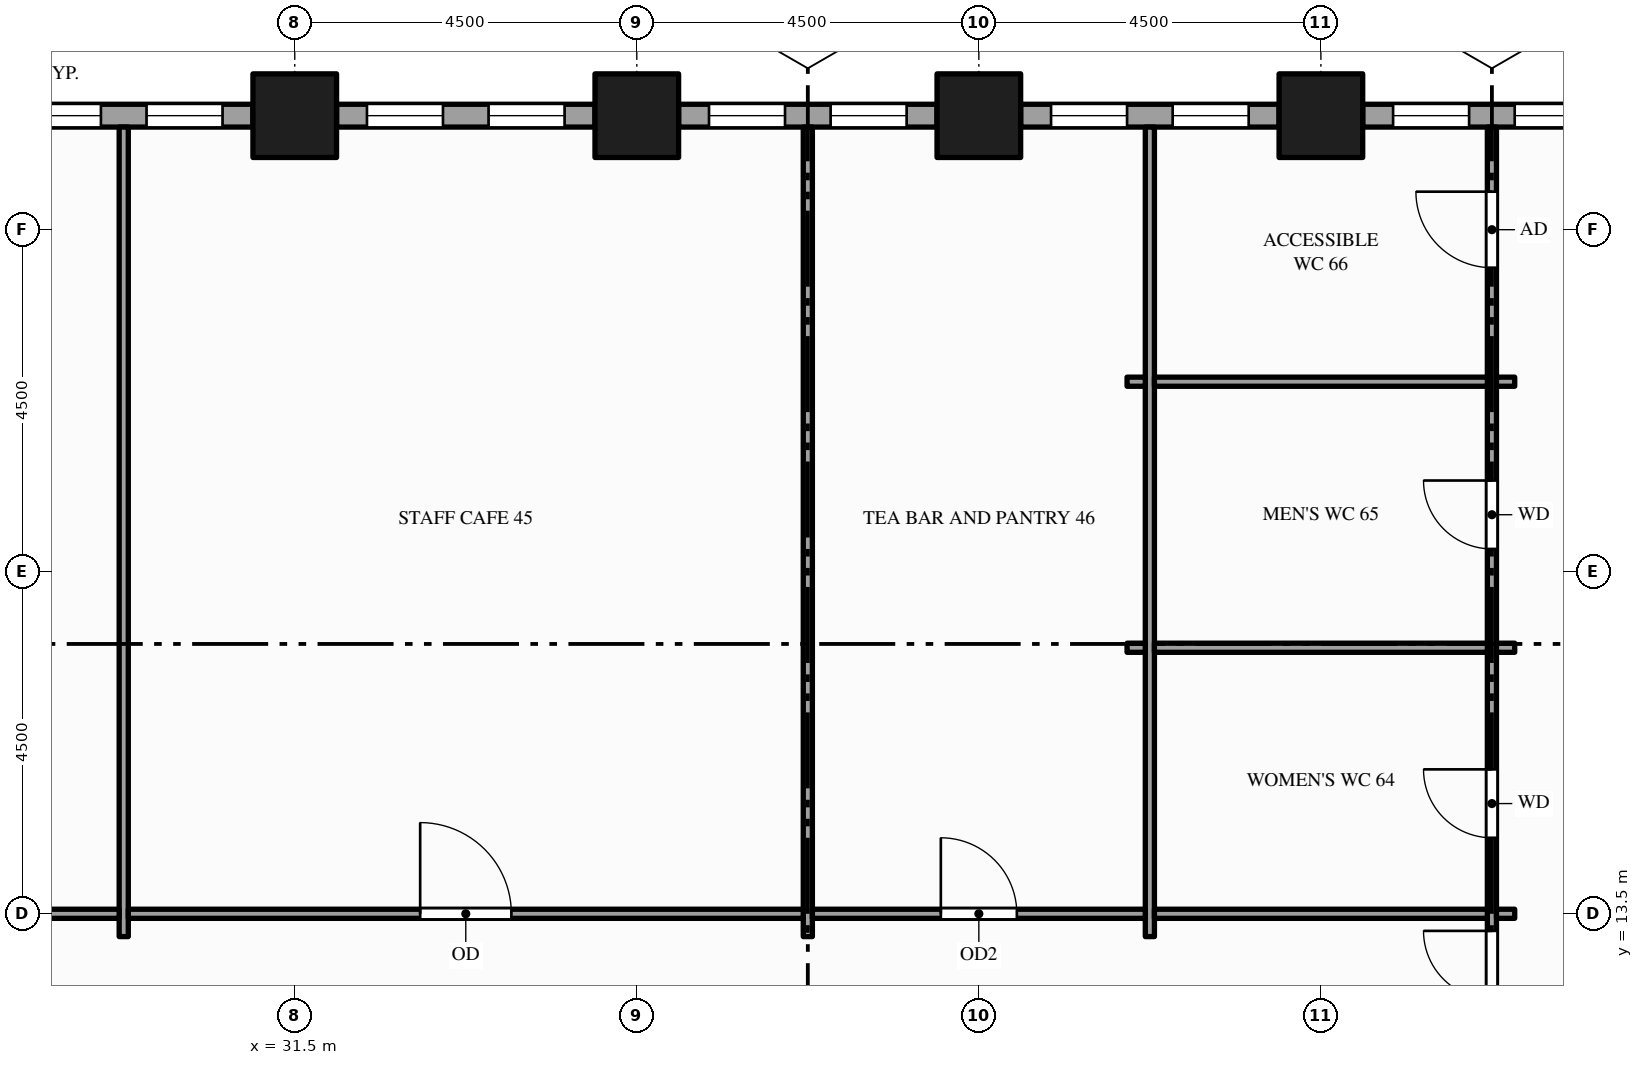
"""IFC4 building model, lengths in metres.
Left out: names, types, materials, properties, quantities, classifications, styles, units other than length and angle.
Written with IfcOpenShell. Run it as: python <this file> out.ifc"""

import sys

from ifc_helpers import new_model, si_unit, direction, frame, frame_2d, origin, origin_2d, place, context, subcontext, project, spatial, rectangle, hollow_rectangle, extrude, element, fill, save


model = new_model("IFC4")
c1 = context("Model", 3, precision=1e-05, world=origin(), true_north=direction((0.0, 1.0)))
c2 = subcontext(c1, "Body", "Model", "MODEL_VIEW")
j1 = project(units=[si_unit("LENGTHUNIT", "METRE"), si_unit("PLANEANGLEUNIT", "RADIAN")], contexts=[c1])
p1 = place(None, origin())
s1 = spatial("IfcSite", under=j1, at=p1, CompositionType="ELEMENT")
p2 = place(p1, origin())
s2 = spatial("IfcBuilding", under=s1, at=p2, CompositionType="ELEMENT")
p3 = place(p2, frame((0.0, 0.0, 45.0)))
s3 = spatial("IfcBuildingStorey", under=s2, at=p3, CompositionType="ELEMENT", Elevation=45.0)
for number, where, z_axis, x_axis in (
    (1, (31.5, 24.0, -0.15), (0.0, 0.0, 1.0), (1.0, 0.0, 0.0)),
    (2, (36.0, 24.0, -0.15), (0.0, 0.0, 1.0), (1.0, 0.0, 0.0)),
    (3, (40.5, 24.0, -0.15), (0.0, 0.0, 1.0), (1.0, 0.0, 0.0)),
    (4, (45.0, 24.0, -0.15), (0.0, 0.0, 1.0), (1.0, 0.0, 0.0)),
):
    element("IfcColumn", number, at=place(p3, frame(where, z_axis=z_axis, x_axis=x_axis)), inside=s3, PredefinedType="COLUMN", context=c2, shape_type="SweptSolid", body=[
        extrude(hollow_rectangle(XDim=1.1, YDim=1.1, WallThickness=0.06, at=origin_2d()), origin(), (0.0, 0.0, 1.0), 4.0),
    ])
p4 = place(p3, frame((48.95, 24.0, 0.0), z_axis=(0.0, 0.0, 1.0), x_axis=(-1.0, 0.0, 0.0)))
e5 = element("IfcWall", 5, at=p4, inside=s3, PredefinedType="STANDARD", context=c2, shape_type="SweptSolid", body=[
    extrude(rectangle(XDim=3.4, YDim=0.3, at=frame_2d((1.7, 0.0))), origin(), (0.0, 0.0, 1.0), 3.144),
])
p5 = place(p4, frame((0.4, 0.0, 0.9)))
e6 = element("IfcOpeningElement", 6, at=p5, cuts=e5, PredefinedType="OPENING", context=c2, shape_type="SweptSolid", body=[
    extrude(rectangle(XDim=1.0, YDim=2.0, at=frame_2d((0.5, 1.0))), frame((0.0, 0.16, 0.0), z_axis=(0.0, -1.0, 0.0), x_axis=(1.0, 0.0, 0.0)), (0.0, 0.0, 1.0), 0.32),
])
p6 = place(p4, frame((2.0, 0.0, 0.9)))
e7 = element("IfcOpeningElement", 7, at=p6, cuts=e5, PredefinedType="OPENING", context=c2, shape_type="SweptSolid", body=[
    extrude(rectangle(XDim=1.0, YDim=2.0, at=frame_2d((0.5, 1.0))), frame((0.0, 0.16, 0.0), z_axis=(0.0, -1.0, 0.0), x_axis=(1.0, 0.0, 0.0)), (0.0, 0.0, 1.0), 0.32),
])
p7 = place(p3, frame((44.45, 24.0, 0.0), z_axis=(0.0, 0.0, 1.0), x_axis=(-1.0, 0.0, 0.0)))
e8 = element("IfcWall", 8, at=p7, inside=s3, PredefinedType="STANDARD", context=c2, shape_type="SweptSolid", body=[
    extrude(rectangle(XDim=3.4, YDim=0.3, at=frame_2d((1.7, 0.0))), origin(), (0.0, 0.0, 1.0), 3.144),
])
p8 = place(p7, frame((0.4, 0.0, 0.9)))
e9 = element("IfcOpeningElement", 9, at=p8, cuts=e8, PredefinedType="OPENING", context=c2, shape_type="SweptSolid", body=[
    extrude(rectangle(XDim=1.0, YDim=2.0, at=frame_2d((0.5, 1.0))), frame((0.0, 0.16, 0.0), z_axis=(0.0, -1.0, 0.0), x_axis=(1.0, 0.0, 0.0)), (0.0, 0.0, 1.0), 0.32),
])
p9 = place(p7, frame((2.0, 0.0, 0.9)))
e10 = element("IfcOpeningElement", 10, at=p9, cuts=e8, PredefinedType="OPENING", context=c2, shape_type="SweptSolid", body=[
    extrude(rectangle(XDim=1.0, YDim=2.0, at=frame_2d((0.5, 1.0))), frame((0.0, 0.16, 0.0), z_axis=(0.0, -1.0, 0.0), x_axis=(1.0, 0.0, 0.0)), (0.0, 0.0, 1.0), 0.32),
])
p10 = place(p3, frame((39.95, 24.0, 0.0), z_axis=(0.0, 0.0, 1.0), x_axis=(-1.0, 0.0, 0.0)))
e11 = element("IfcWall", 11, at=p10, inside=s3, PredefinedType="STANDARD", context=c2, shape_type="SweptSolid", body=[
    extrude(rectangle(XDim=3.4, YDim=0.3, at=frame_2d((1.7, 0.0))), origin(), (0.0, 0.0, 1.0), 3.144),
])
p11 = place(p10, frame((0.4, 0.0, 0.9)))
e12 = element("IfcOpeningElement", 12, at=p11, cuts=e11, PredefinedType="OPENING", context=c2, shape_type="SweptSolid", body=[
    extrude(rectangle(XDim=1.0, YDim=2.0, at=frame_2d((0.5, 1.0))), frame((0.0, 0.16, 0.0), z_axis=(0.0, -1.0, 0.0), x_axis=(1.0, 0.0, 0.0)), (0.0, 0.0, 1.0), 0.32),
])
p12 = place(p10, frame((2.0, 0.0, 0.9)))
e13 = element("IfcOpeningElement", 13, at=p12, cuts=e11, PredefinedType="OPENING", context=c2, shape_type="SweptSolid", body=[
    extrude(rectangle(XDim=1.0, YDim=2.0, at=frame_2d((0.5, 1.0))), frame((0.0, 0.16, 0.0), z_axis=(0.0, -1.0, 0.0), x_axis=(1.0, 0.0, 0.0)), (0.0, 0.0, 1.0), 0.32),
])
p13 = place(p3, frame((35.45, 24.0, 0.0), z_axis=(0.0, 0.0, 1.0), x_axis=(-1.0, 0.0, 0.0)))
e14 = element("IfcWall", 14, at=p13, inside=s3, PredefinedType="STANDARD", context=c2, shape_type="SweptSolid", body=[
    extrude(rectangle(XDim=3.4, YDim=0.3, at=frame_2d((1.7, 0.0))), origin(), (0.0, 0.0, 1.0), 3.144),
])
p14 = place(p13, frame((0.4, 0.0, 0.9)))
e15 = element("IfcOpeningElement", 15, at=p14, cuts=e14, PredefinedType="OPENING", context=c2, shape_type="SweptSolid", body=[
    extrude(rectangle(XDim=1.0, YDim=2.0, at=frame_2d((0.5, 1.0))), frame((0.0, 0.16, 0.0), z_axis=(0.0, -1.0, 0.0), x_axis=(1.0, 0.0, 0.0)), (0.0, 0.0, 1.0), 0.32),
])
p15 = place(p13, frame((2.0, 0.0, 0.9)))
e16 = element("IfcOpeningElement", 16, at=p15, cuts=e14, PredefinedType="OPENING", context=c2, shape_type="SweptSolid", body=[
    extrude(rectangle(XDim=1.0, YDim=2.0, at=frame_2d((0.5, 1.0))), frame((0.0, 0.16, 0.0), z_axis=(0.0, -1.0, 0.0), x_axis=(1.0, 0.0, 0.0)), (0.0, 0.0, 1.0), 0.32),
])
p16 = place(p3, frame((30.95, 24.0, 0.0), z_axis=(0.0, 0.0, 1.0), x_axis=(-1.0, 0.0, 0.0)))
e17 = element("IfcWall", 17, at=p16, inside=s3, PredefinedType="STANDARD", context=c2, shape_type="SweptSolid", body=[
    extrude(rectangle(XDim=4.9, YDim=0.3, at=frame_2d((2.45, 0.0))), origin(), (0.0, 0.0, 1.0), 3.144),
])
p17 = place(p16, frame((0.4, 0.0, 0.9)))
e18 = element("IfcOpeningElement", 18, at=p17, cuts=e17, PredefinedType="OPENING", context=c2, shape_type="SweptSolid", body=[
    extrude(rectangle(XDim=1.0, YDim=2.0, at=frame_2d((0.5, 1.0))), frame((0.0, 0.16, 0.0), z_axis=(0.0, -1.0, 0.0), x_axis=(1.0, 0.0, 0.0)), (0.0, 0.0, 1.0), 0.32),
])
p18 = place(p16, frame((2.0, 0.0, 0.9)))
e19 = element("IfcOpeningElement", 19, at=p18, cuts=e17, PredefinedType="OPENING", context=c2, shape_type="SweptSolid", body=[
    extrude(rectangle(XDim=1.65, YDim=2.0, at=frame_2d((0.825, 1.0))), frame((0.0, 0.16, 0.0), z_axis=(0.0, -1.0, 0.0), x_axis=(1.0, 0.0, 0.0)), (0.0, 0.0, 1.0), 0.32),
])
for number, where, z_axis, x_axis in (
    (20, (29.25, 13.2, 0.0), (0.0, 0.0, 1.0), (0.0, 1.0, 0.0)),
    (21, (38.25, 13.2, 0.0), (0.0, 0.0, 1.0), (0.0, 1.0, 0.0)),
    (22, (42.75, 13.2, 0.0), (0.0, 0.0, 1.0), (0.0, 1.0, 0.0)),
):
    element("IfcWall", number, at=place(p3, frame(where, z_axis=z_axis, x_axis=x_axis)), inside=s3, PredefinedType="PARTITIONING", context=c2, shape_type="SweptSolid", body=[
        extrude(rectangle(XDim=10.65, YDim=0.12, at=frame_2d((5.325, 0.0))), origin(), (0.0, 0.0, 1.0), 2.938),
    ])
p19 = place(p3, frame((47.25, 1.65, 0.0), z_axis=(0.0, 0.0, 1.0), x_axis=(0.0, 1.0, 0.0)))
e23 = element("IfcWall", 23, at=p19, inside=s3, PredefinedType="PARTITIONING", context=c2, shape_type="SweptSolid", body=[
    extrude(rectangle(XDim=22.2, YDim=0.12, at=frame_2d((11.1, 0.0))), origin(), (0.0, 0.0, 1.0), 2.938),
])
p20 = place(p19, frame((9.825, 0.0, 0.0)))
e24 = element("IfcOpeningElement", 24, at=p20, cuts=e23, PredefinedType="OPENING", context=c2, shape_type="SweptSolid", body=[
    extrude(rectangle(XDim=1.8, YDim=2.1, at=frame_2d((0.9, 1.05))), frame((0.0, 0.07, 0.0), z_axis=(0.0, -1.0, 0.0), x_axis=(1.0, 0.0, 0.0)), (0.0, 0.0, 1.0), 0.14),
])
p21 = place(p19, frame((12.85, 0.0, 0.0)))
e25 = element("IfcOpeningElement", 25, at=p21, cuts=e23, PredefinedType="OPENING", context=c2, shape_type="SweptSolid", body=[
    extrude(rectangle(XDim=0.9, YDim=2.1, at=frame_2d((0.45, 1.05))), frame((0.0, 0.07, 0.0), z_axis=(0.0, -1.0, 0.0), x_axis=(1.0, 0.0, 0.0)), (0.0, 0.0, 1.0), 0.14),
])
p22 = place(p19, frame((16.65, 0.0, 0.0)))
e26 = element("IfcOpeningElement", 26, at=p22, cuts=e23, PredefinedType="OPENING", context=c2, shape_type="SweptSolid", body=[
    extrude(rectangle(XDim=0.9, YDim=2.1, at=frame_2d((0.45, 1.05))), frame((0.0, 0.07, 0.0), z_axis=(0.0, -1.0, 0.0), x_axis=(1.0, 0.0, 0.0)), (0.0, 0.0, 1.0), 0.14),
])
p23 = place(p19, frame((20.35, 0.0, 0.0)))
e27 = element("IfcOpeningElement", 27, at=p23, cuts=e23, PredefinedType="OPENING", context=c2, shape_type="SweptSolid", body=[
    extrude(rectangle(XDim=1.0, YDim=2.1, at=frame_2d((0.5, 1.05))), frame((0.0, 0.07, 0.0), z_axis=(0.0, -1.0, 0.0), x_axis=(1.0, 0.0, 0.0)), (0.0, 0.0, 1.0), 0.14),
])
p24 = place(p3, frame((9.06, 13.5, 0.0), z_axis=(0.0, 0.0, 1.0), x_axis=(1.0, 0.0, 0.0)))
e28 = element("IfcWall", 28, at=p24, inside=s3, PredefinedType="PARTITIONING", context=c2, shape_type="SweptSolid", body=[
    extrude(rectangle(XDim=20.13, YDim=0.12, at=frame_2d((10.065, 0.0))), origin(), (0.0, 0.0, 1.0), 2.938),
])
p25 = place(p24, frame((3.54, 0.0, 0.0)))
e29 = element("IfcOpeningElement", 29, at=p25, cuts=e28, PredefinedType="OPENING", context=c2, shape_type="SweptSolid", body=[
    extrude(rectangle(XDim=1.8, YDim=2.1, at=frame_2d((0.9, 1.05))), frame((0.0, 0.07, 0.0), z_axis=(0.0, -1.0, 0.0), x_axis=(1.0, 0.0, 0.0)), (0.0, 0.0, 1.0), 0.14),
])
p26 = place(p3, frame((29.31, 13.5, 0.0), z_axis=(0.0, 0.0, 1.0), x_axis=(1.0, 0.0, 0.0)))
e30 = element("IfcWall", 30, at=p26, inside=s3, PredefinedType="PARTITIONING", context=c2, shape_type="SweptSolid", body=[
    extrude(rectangle(XDim=8.88, YDim=0.12, at=frame_2d((4.44, 0.0))), origin(), (0.0, 0.0, 1.0), 2.938),
])
p27 = place(p26, frame((3.84, 0.0, 0.0)))
e31 = element("IfcOpeningElement", 31, at=p27, cuts=e30, PredefinedType="OPENING", context=c2, shape_type="SweptSolid", body=[
    extrude(rectangle(XDim=1.2, YDim=2.1, at=frame_2d((0.6, 1.05))), frame((0.0, 0.07, 0.0), z_axis=(0.0, -1.0, 0.0), x_axis=(1.0, 0.0, 0.0)), (0.0, 0.0, 1.0), 0.14),
])
p28 = place(p3, frame((38.31, 13.5, 0.0), z_axis=(0.0, 0.0, 1.0), x_axis=(1.0, 0.0, 0.0)))
e32 = element("IfcWall", 32, at=p28, inside=s3, PredefinedType="PARTITIONING", context=c2, shape_type="SweptSolid", body=[
    extrude(rectangle(XDim=4.38, YDim=0.12, at=frame_2d((2.19, 0.0))), origin(), (0.0, 0.0, 1.0), 2.938),
])
p29 = place(p28, frame((1.69, 0.0, 0.0)))
e33 = element("IfcOpeningElement", 33, at=p29, cuts=e32, PredefinedType="OPENING", context=c2, shape_type="SweptSolid", body=[
    extrude(rectangle(XDim=1.0, YDim=2.1, at=frame_2d((0.5, 1.05))), frame((0.0, 0.07, 0.0), z_axis=(0.0, -1.0, 0.0), x_axis=(1.0, 0.0, 0.0)), (0.0, 0.0, 1.0), 0.14),
])
p30 = place(p3, frame((42.81, 13.5, 0.0), z_axis=(0.0, 0.0, 1.0), x_axis=(1.0, 0.0, 0.0)))
e34 = element("IfcWall", 34, at=p30, inside=s3, PredefinedType="PARTITIONING", context=c2, shape_type="SweptSolid", body=[
    extrude(rectangle(XDim=4.38, YDim=0.12, at=frame_2d((2.19, 0.0))), origin(), (0.0, 0.0, 1.0), 2.938),
])
for number, where, z_axis, x_axis in (
    (35, (47.31, 13.5, 0.0), (0.0, 0.0, 1.0), (1.0, 0.0, 0.0)),
    (36, (42.45, 17.0, 0.0), (0.0, 0.0, 1.0), (1.0, 0.0, 0.0)),
):
    element("IfcWall", number, at=place(p3, frame(where, z_axis=z_axis, x_axis=x_axis)), inside=s3, PredefinedType="PARTITIONING", context=c2, shape_type="SweptSolid", body=[
        extrude(rectangle(XDim=0.24, YDim=0.12, at=frame_2d((0.12, 0.0))), origin(), (0.0, 0.0, 1.0), 2.938),
    ])
p31 = place(p3, frame((42.81, 17.0, 0.0), z_axis=(0.0, 0.0, 1.0), x_axis=(1.0, 0.0, 0.0)))
e37 = element("IfcWall", 37, at=p31, inside=s3, PredefinedType="PARTITIONING", context=c2, shape_type="SweptSolid", body=[
    extrude(rectangle(XDim=4.38, YDim=0.12, at=frame_2d((2.19, 0.0))), origin(), (0.0, 0.0, 1.0), 2.938),
])
for number, where, z_axis, x_axis in (
    (38, (47.31, 17.0, 0.0), (0.0, 0.0, 1.0), (1.0, 0.0, 0.0)),
    (39, (42.45, 20.5, 0.0), (0.0, 0.0, 1.0), (1.0, 0.0, 0.0)),
):
    element("IfcWall", number, at=place(p3, frame(where, z_axis=z_axis, x_axis=x_axis)), inside=s3, PredefinedType="PARTITIONING", context=c2, shape_type="SweptSolid", body=[
        extrude(rectangle(XDim=0.24, YDim=0.12, at=frame_2d((0.12, 0.0))), origin(), (0.0, 0.0, 1.0), 2.938),
    ])
p32 = place(p3, frame((42.81, 20.5, 0.0), z_axis=(0.0, 0.0, 1.0), x_axis=(1.0, 0.0, 0.0)))
e40 = element("IfcWall", 40, at=p32, inside=s3, PredefinedType="PARTITIONING", context=c2, shape_type="SweptSolid", body=[
    extrude(rectangle(XDim=4.38, YDim=0.12, at=frame_2d((2.19, 0.0))), origin(), (0.0, 0.0, 1.0), 2.938),
])
p33 = place(p3, frame((47.31, 20.5, 0.0), z_axis=(0.0, 0.0, 1.0), x_axis=(1.0, 0.0, 0.0)))
e41 = element("IfcWall", 41, at=p33, inside=s3, PredefinedType="PARTITIONING", context=c2, shape_type="SweptSolid", body=[
    extrude(rectangle(XDim=0.24, YDim=0.12, at=frame_2d((0.12, 0.0))), origin(), (0.0, 0.0, 1.0), 2.938),
])
p34 = place(p5, origin())
e42 = element("IfcWindow", 42, at=p34, inside=s3, PartitioningType="SINGLE_PANEL", PredefinedType="WINDOW", context=c2, shape_type="SweptSolid", body=[
    extrude(rectangle(XDim=1.0, YDim=2.0, at=frame_2d((0.5, 1.0))), frame((0.0, 0.03, 0.0), z_axis=(0.0, -1.0, 0.0), x_axis=(1.0, 0.0, 0.0)), (0.0, 0.0, 1.0), 0.06),
])
fill(e6, e42)
p35 = place(p6, origin())
e43 = element("IfcWindow", 43, at=p35, inside=s3, PartitioningType="SINGLE_PANEL", PredefinedType="WINDOW", context=c2, shape_type="SweptSolid", body=[
    extrude(rectangle(XDim=1.0, YDim=2.0, at=frame_2d((0.5, 1.0))), frame((0.0, 0.03, 0.0), z_axis=(0.0, -1.0, 0.0), x_axis=(1.0, 0.0, 0.0)), (0.0, 0.0, 1.0), 0.06),
])
fill(e7, e43)
p36 = place(p8, origin())
e44 = element("IfcWindow", 44, at=p36, inside=s3, PartitioningType="SINGLE_PANEL", PredefinedType="WINDOW", context=c2, shape_type="SweptSolid", body=[
    extrude(rectangle(XDim=1.0, YDim=2.0, at=frame_2d((0.5, 1.0))), frame((0.0, 0.03, 0.0), z_axis=(0.0, -1.0, 0.0), x_axis=(1.0, 0.0, 0.0)), (0.0, 0.0, 1.0), 0.06),
])
fill(e9, e44)
p37 = place(p9, origin())
e45 = element("IfcWindow", 45, at=p37, inside=s3, PartitioningType="SINGLE_PANEL", PredefinedType="WINDOW", context=c2, shape_type="SweptSolid", body=[
    extrude(rectangle(XDim=1.0, YDim=2.0, at=frame_2d((0.5, 1.0))), frame((0.0, 0.03, 0.0), z_axis=(0.0, -1.0, 0.0), x_axis=(1.0, 0.0, 0.0)), (0.0, 0.0, 1.0), 0.06),
])
fill(e10, e45)
p38 = place(p11, origin())
e46 = element("IfcWindow", 46, at=p38, inside=s3, PartitioningType="SINGLE_PANEL", PredefinedType="WINDOW", context=c2, shape_type="SweptSolid", body=[
    extrude(rectangle(XDim=1.0, YDim=2.0, at=frame_2d((0.5, 1.0))), frame((0.0, 0.03, 0.0), z_axis=(0.0, -1.0, 0.0), x_axis=(1.0, 0.0, 0.0)), (0.0, 0.0, 1.0), 0.06),
])
fill(e12, e46)
p39 = place(p12, origin())
e47 = element("IfcWindow", 47, at=p39, inside=s3, PartitioningType="SINGLE_PANEL", PredefinedType="WINDOW", context=c2, shape_type="SweptSolid", body=[
    extrude(rectangle(XDim=1.0, YDim=2.0, at=frame_2d((0.5, 1.0))), frame((0.0, 0.03, 0.0), z_axis=(0.0, -1.0, 0.0), x_axis=(1.0, 0.0, 0.0)), (0.0, 0.0, 1.0), 0.06),
])
fill(e13, e47)
p40 = place(p14, origin())
e48 = element("IfcWindow", 48, at=p40, inside=s3, PartitioningType="SINGLE_PANEL", PredefinedType="WINDOW", context=c2, shape_type="SweptSolid", body=[
    extrude(rectangle(XDim=1.0, YDim=2.0, at=frame_2d((0.5, 1.0))), frame((0.0, 0.03, 0.0), z_axis=(0.0, -1.0, 0.0), x_axis=(1.0, 0.0, 0.0)), (0.0, 0.0, 1.0), 0.06),
])
fill(e15, e48)
p41 = place(p15, origin())
e49 = element("IfcWindow", 49, at=p41, inside=s3, PartitioningType="SINGLE_PANEL", PredefinedType="WINDOW", context=c2, shape_type="SweptSolid", body=[
    extrude(rectangle(XDim=1.0, YDim=2.0, at=frame_2d((0.5, 1.0))), frame((0.0, 0.03, 0.0), z_axis=(0.0, -1.0, 0.0), x_axis=(1.0, 0.0, 0.0)), (0.0, 0.0, 1.0), 0.06),
])
fill(e16, e49)
p42 = place(p17, origin())
e50 = element("IfcWindow", 50, at=p42, inside=s3, PartitioningType="SINGLE_PANEL", PredefinedType="WINDOW", context=c2, shape_type="SweptSolid", body=[
    extrude(rectangle(XDim=1.0, YDim=2.0, at=frame_2d((0.5, 1.0))), frame((0.0, 0.03, 0.0), z_axis=(0.0, -1.0, 0.0), x_axis=(1.0, 0.0, 0.0)), (0.0, 0.0, 1.0), 0.06),
])
fill(e18, e50)
p43 = place(p18, origin())
e51 = element("IfcWindow", 51, at=p43, inside=s3, PartitioningType="SINGLE_PANEL", PredefinedType="WINDOW", context=c2, shape_type="SweptSolid", body=[
    extrude(rectangle(XDim=1.65, YDim=2.0, at=frame_2d((0.825, 1.0))), frame((0.0, 0.03, 0.0), z_axis=(0.0, -1.0, 0.0), x_axis=(1.0, 0.0, 0.0)), (0.0, 0.0, 1.0), 0.06),
])
fill(e19, e51)
p44 = place(p20, origin())
e52 = element("IfcDoor", 52, at=p44, inside=s3, OperationType="DOUBLE_DOOR_SINGLE_SWING", PredefinedType="DOOR", context=c2, shape_type="SweptSolid", body=[
    extrude(rectangle(XDim=1.8, YDim=2.1, at=frame_2d((0.9, 1.05))), frame((0.0, 0.025, 0.0), z_axis=(0.0, -1.0, 0.0), x_axis=(1.0, 0.0, 0.0)), (0.0, 0.0, 1.0), 0.05),
])
fill(e24, e52)
p45 = place(p27, origin())
e53 = element("IfcDoor", 53, at=p45, inside=s3, OperationType="SINGLE_SWING_LEFT", PredefinedType="DOOR", context=c2, shape_type="SweptSolid", body=[
    extrude(rectangle(XDim=1.2, YDim=2.1, at=frame_2d((0.6, 1.05))), frame((0.0, 0.025, 0.0), z_axis=(0.0, -1.0, 0.0), x_axis=(1.0, 0.0, 0.0)), (0.0, 0.0, 1.0), 0.05),
])
fill(e31, e53)
p46 = place(p29, origin())
e54 = element("IfcDoor", 54, at=p46, inside=s3, OperationType="SINGLE_SWING_LEFT", PredefinedType="DOOR", context=c2, shape_type="SweptSolid", body=[
    extrude(rectangle(XDim=1.0, YDim=2.1, at=frame_2d((0.5, 1.05))), frame((0.0, 0.025, 0.0), z_axis=(0.0, -1.0, 0.0), x_axis=(1.0, 0.0, 0.0)), (0.0, 0.0, 1.0), 0.05),
])
fill(e33, e54)
p47 = place(p21, origin())
e55 = element("IfcDoor", 55, at=p47, inside=s3, OperationType="SINGLE_SWING_RIGHT", PredefinedType="DOOR", context=c2, shape_type="SweptSolid", body=[
    extrude(rectangle(XDim=0.9, YDim=2.1, at=frame_2d((0.45, 1.05))), frame((0.0, 0.025, 0.0), z_axis=(0.0, -1.0, 0.0), x_axis=(1.0, 0.0, 0.0)), (0.0, 0.0, 1.0), 0.05),
])
fill(e25, e55)
p48 = place(p22, origin())
e56 = element("IfcDoor", 56, at=p48, inside=s3, OperationType="SINGLE_SWING_RIGHT", PredefinedType="DOOR", context=c2, shape_type="SweptSolid", body=[
    extrude(rectangle(XDim=0.9, YDim=2.1, at=frame_2d((0.45, 1.05))), frame((0.0, 0.025, 0.0), z_axis=(0.0, -1.0, 0.0), x_axis=(1.0, 0.0, 0.0)), (0.0, 0.0, 1.0), 0.05),
])
fill(e26, e56)
p49 = place(p23, origin())
e57 = element("IfcDoor", 57, at=p49, inside=s3, OperationType="SINGLE_SWING_RIGHT", PredefinedType="DOOR", context=c2, shape_type="SweptSolid", body=[
    extrude(rectangle(XDim=1.0, YDim=2.1, at=frame_2d((0.5, 1.05))), frame((0.0, 0.025, 0.0), z_axis=(0.0, -1.0, 0.0), x_axis=(1.0, 0.0, 0.0)), (0.0, 0.0, 1.0), 0.05),
])
fill(e27, e57)
save(model, sys.argv[1])
